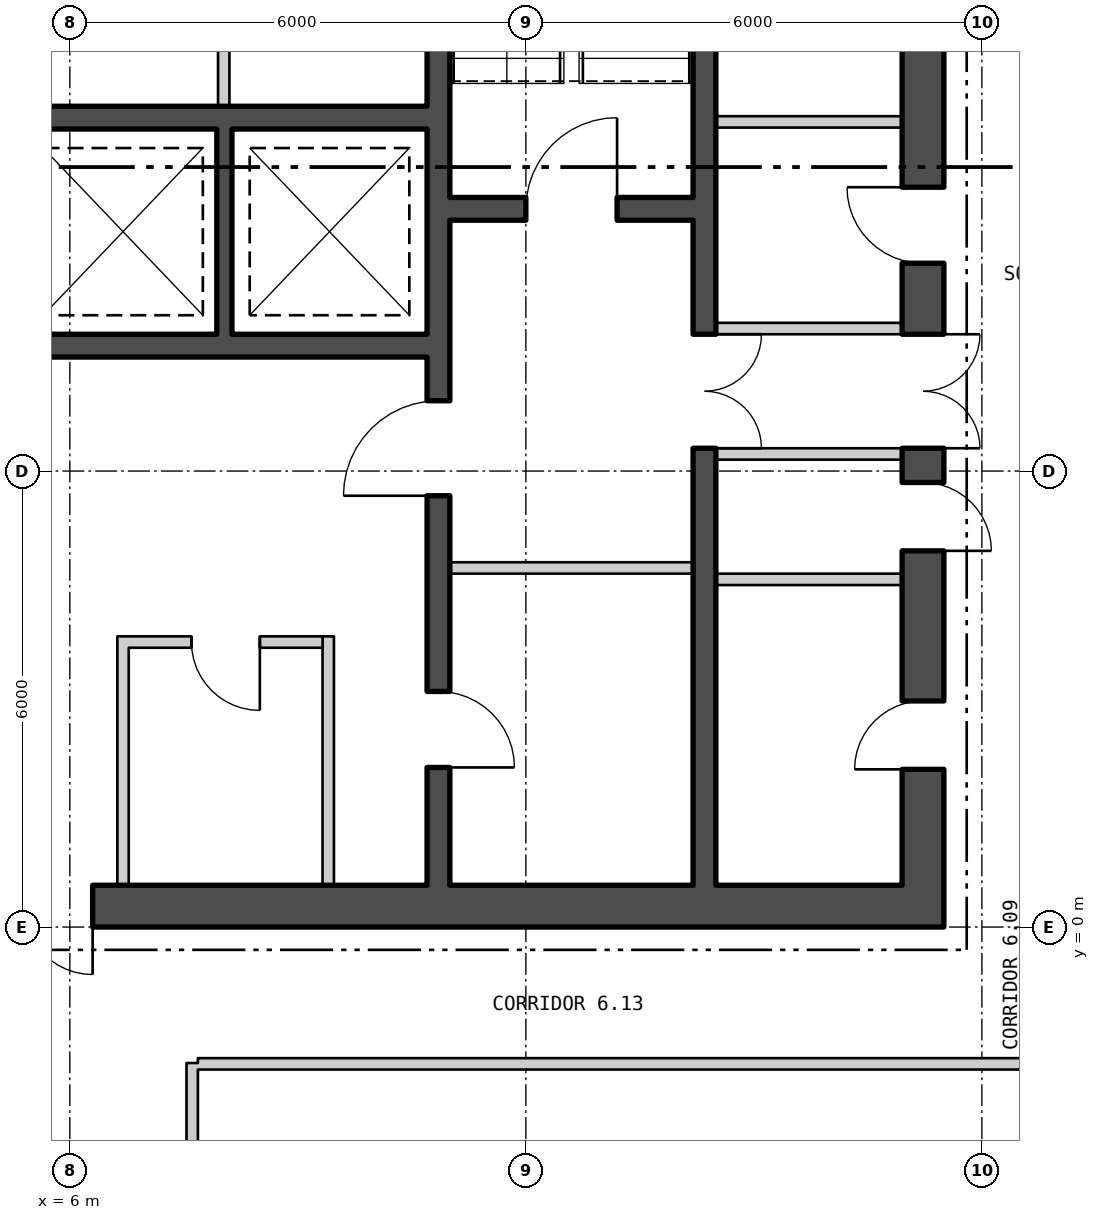
"""IFC4 building model, lengths in metres.
Left out: names, types, materials, properties, quantities, classifications, styles, units other than length and angle.
Written with IfcOpenShell. Run it as: python <this file> out.ifc"""

import sys

from ifc_helpers import new_model, si_unit, direction, frame, frame_2d, origin, place, context, subcontext, project, spatial, polyline, rectangle, outline, extrude, element, fill, save


model = new_model("IFC4")
c1 = context("Model", 3, precision=1e-05, world=origin(), true_north=direction((0.0, 1.0)))
c2 = subcontext(c1, "Body", "Model", "MODEL_VIEW")
j1 = project(units=[si_unit("LENGTHUNIT", "METRE"), si_unit("PLANEANGLEUNIT", "RADIAN")], contexts=[c1])
p1 = place(None, origin())
s1 = spatial("IfcSite", under=j1, at=p1, CompositionType="ELEMENT")
p2 = place(p1, origin())
s2 = spatial("IfcBuilding", under=s1, at=p2, CompositionType="ELEMENT")
p3 = place(p2, frame((0.0, 0.0, 84.3)))
s3 = spatial("IfcBuildingStorey", under=s2, at=p3, CompositionType="ELEMENT", Elevation=84.3)
p4 = place(p3, frame((5.085, -28.436, -0.18), z_axis=(0.0, 0.0, 1.0), x_axis=(0.499999194392, 0.866025868902, 0.0)))
e1 = element("IfcWall", 1, at=p4, inside=s3, PredefinedType="SOLIDWALL", context=c2, shape_type="SweptSolid", body=[
    extrude(outline(polyline([(-0.13, -0.225), (45.86, -0.225), (45.6, 0.225), (0.13, 0.225), (-0.13, -0.225)])), origin(), (0.0, 0.0, 1.0), 4.28),
])
p5 = place(p4, frame((1.424, 0.0, 1.08)))
e2 = element("IfcOpeningElement", 2, at=p5, cuts=e1, PredefinedType="OPENING", context=c2, shape_type="SweptSolid", body=[
    extrude(rectangle(XDim=2.4, YDim=2.6, at=frame_2d((1.2, 1.3))), frame((0.0, 0.235, 0.0), z_axis=(0.0, -1.0, 0.0), x_axis=(1.0, 0.0, 0.0)), (0.0, 0.0, 1.0), 0.47),
])
p6 = place(p4, frame((5.892, 0.0, 1.08)))
e3 = element("IfcOpeningElement", 3, at=p6, cuts=e1, PredefinedType="OPENING", context=c2, shape_type="SweptSolid", body=[
    extrude(rectangle(XDim=2.4, YDim=2.6, at=frame_2d((1.2, 1.3))), frame((0.0, 0.235, 0.0), z_axis=(0.0, -1.0, 0.0), x_axis=(1.0, 0.0, 0.0)), (0.0, 0.0, 1.0), 0.47),
])
p7 = place(p4, frame((10.399, 0.0, 1.08)))
e4 = element("IfcOpeningElement", 4, at=p7, cuts=e1, PredefinedType="OPENING", context=c2, shape_type="SweptSolid", body=[
    extrude(rectangle(XDim=2.4, YDim=2.6, at=frame_2d((1.2, 1.3))), frame((0.0, 0.235, 0.0), z_axis=(0.0, -1.0, 0.0), x_axis=(1.0, 0.0, 0.0)), (0.0, 0.0, 1.0), 0.47),
])
p8 = place(p4, frame((14.905, 0.0, 1.08)))
e5 = element("IfcOpeningElement", 5, at=p8, cuts=e1, PredefinedType="OPENING", context=c2, shape_type="SweptSolid", body=[
    extrude(rectangle(XDim=2.4, YDim=2.6, at=frame_2d((1.2, 1.3))), frame((0.0, 0.235, 0.0), z_axis=(0.0, -1.0, 0.0), x_axis=(1.0, 0.0, 0.0)), (0.0, 0.0, 1.0), 0.47),
])
p9 = place(p4, frame((19.412, 0.0, 1.08)))
e6 = element("IfcOpeningElement", 6, at=p9, cuts=e1, PredefinedType="OPENING", context=c2, shape_type="SweptSolid", body=[
    extrude(rectangle(XDim=2.4, YDim=2.6, at=frame_2d((1.2, 1.3))), frame((0.0, 0.235, 0.0), z_axis=(0.0, -1.0, 0.0), x_axis=(1.0, 0.0, 0.0)), (0.0, 0.0, 1.0), 0.47),
])
p10 = place(p4, frame((23.918, 0.0, 1.08)))
e7 = element("IfcOpeningElement", 7, at=p10, cuts=e1, PredefinedType="OPENING", context=c2, shape_type="SweptSolid", body=[
    extrude(rectangle(XDim=2.4, YDim=2.6, at=frame_2d((1.2, 1.3))), frame((0.0, 0.235, 0.0), z_axis=(0.0, -1.0, 0.0), x_axis=(1.0, 0.0, 0.0)), (0.0, 0.0, 1.0), 0.47),
])
p11 = place(p4, frame((28.425, 0.0, 1.08)))
e8 = element("IfcOpeningElement", 8, at=p11, cuts=e1, PredefinedType="OPENING", context=c2, shape_type="SweptSolid", body=[
    extrude(rectangle(XDim=2.4, YDim=2.6, at=frame_2d((1.2, 1.3))), frame((0.0, 0.235, 0.0), z_axis=(0.0, -1.0, 0.0), x_axis=(1.0, 0.0, 0.0)), (0.0, 0.0, 1.0), 0.47),
])
p12 = place(p4, frame((32.932, 0.0, 1.08)))
e9 = element("IfcOpeningElement", 9, at=p12, cuts=e1, PredefinedType="OPENING", context=c2, shape_type="SweptSolid", body=[
    extrude(rectangle(XDim=2.4, YDim=2.6, at=frame_2d((1.2, 1.3))), frame((0.0, 0.235, 0.0), z_axis=(0.0, -1.0, 0.0), x_axis=(1.0, 0.0, 0.0)), (0.0, 0.0, 1.0), 0.47),
])
p13 = place(p4, frame((37.438, 0.0, 1.08)))
e10 = element("IfcOpeningElement", 10, at=p13, cuts=e1, PredefinedType="OPENING", context=c2, shape_type="SweptSolid", body=[
    extrude(rectangle(XDim=2.4, YDim=2.6, at=frame_2d((1.2, 1.3))), frame((0.0, 0.235, 0.0), z_axis=(0.0, -1.0, 0.0), x_axis=(1.0, 0.0, 0.0)), (0.0, 0.0, 1.0), 0.47),
])
p14 = place(p4, frame((41.907, 0.0, 1.08)))
e11 = element("IfcOpeningElement", 11, at=p14, cuts=e1, PredefinedType="OPENING", context=c2, shape_type="SweptSolid", body=[
    extrude(rectangle(XDim=2.4, YDim=2.6, at=frame_2d((1.2, 1.3))), frame((0.0, 0.235, 0.0), z_axis=(0.0, -1.0, 0.0), x_axis=(1.0, 0.0, 0.0)), (0.0, 0.0, 1.0), 0.47),
])
p15 = place(p3, frame((-17.5, 0.275, 0.0), z_axis=(0.0, 0.0, 1.0), x_axis=(1.0, 0.0, 0.0)))
e12 = element("IfcWall", 12, at=p15, inside=s3, PredefinedType="SHEAR", context=c2, shape_type="SweptSolid", body=[
    extrude(rectangle(XDim=35.0, YDim=0.55, at=frame_2d((17.5, 0.0))), origin(), (0.0, 0.0, 1.0), 4.3),
])
p16 = place(p15, frame((12.0, 0.0, 0.0)))
e13 = element("IfcOpeningElement", 13, at=p16, cuts=e12, PredefinedType="OPENING", context=c2, shape_type="SweptSolid", body=[
    extrude(rectangle(XDim=1.8, YDim=2.4, at=frame_2d((0.9, 1.2))), frame((0.0, 0.285, 0.0), z_axis=(0.0, -1.0, 0.0), x_axis=(1.0, 0.0, 0.0)), (0.0, 0.0, 1.0), 0.57),
])
p17 = place(p15, frame((22.0, 0.0, 0.0)))
e14 = element("IfcOpeningElement", 14, at=p17, cuts=e12, PredefinedType="OPENING", context=c2, shape_type="SweptSolid", body=[
    extrude(rectangle(XDim=1.8, YDim=2.4, at=frame_2d((0.9, 1.2))), frame((0.0, 0.285, 0.0), z_axis=(0.0, -1.0, 0.0), x_axis=(1.0, 0.0, 0.0)), (0.0, 0.0, 1.0), 0.57),
])
p18 = place(p3, frame((17.225, 0.55, 0.0), z_axis=(0.0, 0.0, 1.0), x_axis=(0.0, 1.0, 0.0)))
e15 = element("IfcWall", 15, at=p18, inside=s3, PredefinedType="SHEAR", context=c2, shape_type="SweptSolid", body=[
    extrude(rectangle(XDim=16.9, YDim=0.55, at=frame_2d((8.45, 0.0))), origin(), (0.0, 0.0, 1.0), 4.3),
])
p19 = place(p18, frame((5.75, 0.0, 0.0)))
e16 = element("IfcOpeningElement", 16, at=p19, cuts=e15, PredefinedType="OPENING", context=c2, shape_type="SweptSolid", body=[
    extrude(rectangle(XDim=1.5, YDim=2.1, at=frame_2d((0.75, 1.05))), frame((0.0, 0.285, 0.0), z_axis=(0.0, -1.0, 0.0), x_axis=(1.0, 0.0, 0.0)), (0.0, 0.0, 1.0), 0.57),
])
p20 = place(p18, frame((1.525, 0.0, 0.0)))
e17 = element("IfcOpeningElement", 17, at=p20, cuts=e15, PredefinedType="OPENING", context=c2, shape_type="SweptSolid", body=[
    extrude(rectangle(XDim=0.9, YDim=2.1, at=frame_2d((0.45, 1.05))), frame((0.0, 0.285, 0.0), z_axis=(0.0, -1.0, 0.0), x_axis=(1.0, 0.0, 0.0)), (0.0, 0.0, 1.0), 0.57),
])
p21 = place(p18, frame((4.4, 0.0, 0.0)))
e18 = element("IfcOpeningElement", 18, at=p21, cuts=e15, PredefinedType="OPENING", context=c2, shape_type="SweptSolid", body=[
    extrude(rectangle(XDim=0.9, YDim=2.1, at=frame_2d((0.45, 1.05))), frame((0.0, 0.285, 0.0), z_axis=(0.0, -1.0, 0.0), x_axis=(1.0, 0.0, 0.0)), (0.0, 0.0, 1.0), 0.57),
])
p22 = place(p18, frame((8.184, 0.0, 0.0)))
e19 = element("IfcOpeningElement", 19, at=p22, cuts=e15, PredefinedType="OPENING", context=c2, shape_type="SweptSolid", body=[
    extrude(rectangle(XDim=1.0, YDim=2.1, at=frame_2d((0.5, 1.05))), frame((0.0, 0.285, 0.0), z_axis=(0.0, -1.0, 0.0), x_axis=(1.0, 0.0, 0.0)), (0.0, 0.0, 1.0), 0.57),
])
p23 = place(p18, frame((13.059, 0.0, 0.0)))
e20 = element("IfcOpeningElement", 20, at=p23, cuts=e15, PredefinedType="OPENING", context=c2, shape_type="SweptSolid", body=[
    extrude(rectangle(XDim=0.9, YDim=2.1, at=frame_2d((0.45, 1.05))), frame((0.0, 0.285, 0.0), z_axis=(0.0, -1.0, 0.0), x_axis=(1.0, 0.0, 0.0)), (0.0, 0.0, 1.0), 0.57),
])
p24 = place(p3, frame((10.85, 0.55, 0.0), z_axis=(0.0, 0.0, 1.0), x_axis=(0.0, 1.0, 0.0)))
e21 = element("IfcWall", 21, at=p24, inside=s3, PredefinedType="SHEAR", context=c2, shape_type="SweptSolid", body=[
    extrude(rectangle(XDim=16.9, YDim=0.3, at=frame_2d((8.45, 0.0))), origin(), (0.0, 0.0, 1.0), 4.3),
])
p25 = place(p24, frame((5.125, 0.0, 0.0)))
e22 = element("IfcOpeningElement", 22, at=p25, cuts=e21, PredefinedType="OPENING", context=c2, shape_type="SweptSolid", body=[
    extrude(rectangle(XDim=1.25, YDim=2.1, at=frame_2d((0.625, 1.05))), frame((0.0, 0.16, 0.0), z_axis=(0.0, -1.0, 0.0), x_axis=(1.0, 0.0, 0.0)), (0.0, 0.0, 1.0), 0.32),
])
p26 = place(p24, frame((1.55, 0.0, 0.0)))
e23 = element("IfcOpeningElement", 23, at=p26, cuts=e21, PredefinedType="OPENING", context=c2, shape_type="SweptSolid", body=[
    extrude(rectangle(XDim=1.0, YDim=2.1, at=frame_2d((0.5, 1.05))), frame((0.0, 0.16, 0.0), z_axis=(0.0, -1.0, 0.0), x_axis=(1.0, 0.0, 0.0)), (0.0, 0.0, 1.0), 0.32),
])
p27 = place(p3, frame((14.35, 0.55, 0.0), z_axis=(0.0, 0.0, 1.0), x_axis=(0.0, 1.0, 0.0)))
e24 = element("IfcWall", 24, at=p27, inside=s3, PredefinedType="SHEAR", context=c2, shape_type="SweptSolid", body=[
    extrude(rectangle(XDim=16.9, YDim=0.3, at=frame_2d((8.45, 0.0))), origin(), (0.0, 0.0, 1.0), 4.3),
])
p28 = place(p27, frame((5.75, 0.0, 0.0)))
e25 = element("IfcOpeningElement", 25, at=p28, cuts=e24, PredefinedType="OPENING", context=c2, shape_type="SweptSolid", body=[
    extrude(rectangle(XDim=1.5, YDim=2.1, at=frame_2d((0.75, 1.05))), frame((0.0, 0.16, 0.0), z_axis=(0.0, -1.0, 0.0), x_axis=(1.0, 0.0, 0.0)), (0.0, 0.0, 1.0), 0.32),
])
p29 = place(p3, frame((11.0, 9.45, 0.0), z_axis=(0.0, 0.0, 1.0), x_axis=(1.0, 0.0, 0.0)))
e26 = element("IfcWall", 26, at=p29, inside=s3, PredefinedType="SHEAR", context=c2, shape_type="SweptSolid", body=[
    extrude(rectangle(XDim=3.2, YDim=0.3, at=frame_2d((1.6, 0.0))), origin(), (0.0, 0.0, 1.0), 4.3),
])
p30 = place(p29, frame((1.0, 0.0, 0.0)))
e27 = element("IfcOpeningElement", 27, at=p30, cuts=e26, PredefinedType="OPENING", context=c2, shape_type="SweptSolid", body=[
    extrude(rectangle(XDim=1.2, YDim=2.1, at=frame_2d((0.6, 1.05))), frame((0.0, 0.16, 0.0), z_axis=(0.0, -1.0, 0.0), x_axis=(1.0, 0.0, 0.0)), (0.0, 0.0, 1.0), 0.32),
])
for number, where, z_axis, x_axis in (
    (28, (2.6, 10.65, 0.0), (0.0, 0.0, 1.0), (1.0, 0.0, 0.0)),
    (29, (2.6, 7.65, 0.0), (0.0, 0.0, 1.0), (1.0, 0.0, 0.0)),
):
    element("IfcWall", number, at=place(p3, frame(where, z_axis=z_axis, x_axis=x_axis)), inside=s3, PredefinedType="SHEAR", context=c2, shape_type="SweptSolid", body=[
        extrude(rectangle(XDim=8.1, YDim=0.3, at=frame_2d((4.05, 0.0))), origin(), (0.0, 0.0, 1.0), 4.3),
    ])
p31 = place(p3, frame((8.033, 7.8, 0.0), z_axis=(0.0, 0.0, 1.0), x_axis=(0.0, 1.0, 0.0)))
e30 = element("IfcWall", 30, at=p31, inside=s3, PredefinedType="SHEAR", context=c2, shape_type="SweptSolid", body=[
    extrude(rectangle(XDim=2.7, YDim=0.2, at=frame_2d((1.35, 0.0))), origin(), (0.0, 0.0, 1.0), 4.3),
])
p32 = place(p3, frame((8.025, 10.8, 0.0), z_axis=(0.0, 0.0, 1.0), x_axis=(0.0, 1.0, 0.0)))
e31 = element("IfcWall", 31, at=p32, inside=s3, PredefinedType="PARTITIONING", context=c2, shape_type="SweptSolid", body=[
    extrude(rectangle(XDim=3.6, YDim=0.15, at=frame_2d((1.8, 0.0))), origin(), (0.0, 0.0, 1.0), 4.3),
])
p33 = place(p32, frame((1.175, 0.0, 0.0)))
e32 = element("IfcOpeningElement", 32, at=p33, cuts=e31, PredefinedType="OPENING", context=c2, shape_type="SweptSolid", body=[
    extrude(rectangle(XDim=1.25, YDim=2.1, at=frame_2d((0.625, 1.05))), frame((0.0, 0.085, 0.0), z_axis=(0.0, -1.0, 0.0), x_axis=(1.0, 0.0, 0.0)), (0.0, 0.0, 1.0), 0.17),
])
p34 = place(p3, frame((11.0, 4.725, 0.0), z_axis=(0.0, 0.0, 1.0), x_axis=(1.0, 0.0, 0.0)))
e33 = element("IfcWall", 33, at=p34, inside=s3, PredefinedType="PARTITIONING", context=c2, shape_type="SweptSolid", body=[
    extrude(rectangle(XDim=3.2, YDim=0.15, at=frame_2d((1.6, 0.0))), origin(), (0.0, 0.0, 1.0), 4.3),
])
for number, where, z_axis, x_axis in (
    (34, (14.5, 6.225, 0.0), (0.0, 0.0, 1.0), (1.0, 0.0, 0.0)),
    (35, (14.5, 7.875, 0.0), (0.0, 0.0, 1.0), (1.0, 0.0, 0.0)),
    (36, (14.5, 4.575, 0.0), (0.0, 0.0, 1.0), (1.0, 0.0, 0.0)),
    (37, (14.5, 10.594, 0.0), (0.0, 0.0, 1.0), (1.0, 0.0, 0.0)),
):
    element("IfcWall", number, at=place(p3, frame(where, z_axis=z_axis, x_axis=x_axis)), inside=s3, PredefinedType="PARTITIONING", context=c2, shape_type="SweptSolid", body=[
        extrude(rectangle(XDim=2.45, YDim=0.15, at=frame_2d((1.225, 0.0))), origin(), (0.0, 0.0, 1.0), 4.3),
    ])
for number, where, z_axis, x_axis in (
    (38, (6.7, 0.55, 0.0), (0.0, 0.0, 1.0), (0.0, 1.0, 0.0)),
    (39, (9.4, 0.55, 0.0), (0.0, 0.0, 1.0), (0.0, 1.0, 0.0)),
):
    element("IfcWall", number, at=place(p3, frame(where, z_axis=z_axis, x_axis=x_axis)), inside=s3, PredefinedType="PARTITIONING", context=c2, shape_type="SweptSolid", body=[
        extrude(rectangle(XDim=3.275, YDim=0.15, at=frame_2d((1.637, 0.0))), origin(), (0.0, 0.0, 1.0), 4.3),
    ])
p35 = place(p3, frame((6.775, 3.75, 0.0), z_axis=(0.0, 0.0, 1.0), x_axis=(1.0, 0.0, 0.0)))
e40 = element("IfcWall", 40, at=p35, inside=s3, PredefinedType="PARTITIONING", context=c2, shape_type="SweptSolid", body=[
    extrude(rectangle(XDim=2.55, YDim=0.15, at=frame_2d((1.275, 0.0))), origin(), (0.0, 0.0, 1.0), 4.3),
])
p36 = place(p35, frame((0.825, 0.0, 0.0)))
e41 = element("IfcOpeningElement", 41, at=p36, cuts=e40, PredefinedType="OPENING", context=c2, shape_type="SweptSolid", body=[
    extrude(rectangle(XDim=0.9, YDim=2.1, at=frame_2d((0.45, 1.05))), frame((0.0, 0.085, 0.0), z_axis=(0.0, -1.0, 0.0), x_axis=(1.0, 0.0, 0.0)), (0.0, 0.0, 1.0), 0.17),
])
p37 = place(p3, frame((7.61, -3.508, 0.0), z_axis=(0.0, 0.0, 1.0), x_axis=(0.0, 1.0, 0.0)))
e42 = element("IfcWall", 42, at=p37, inside=s3, PredefinedType="PARTITIONING", context=c2, shape_type="SweptSolid", body=[
    extrude(rectangle(XDim=1.719, YDim=0.15, at=frame_2d((0.86, 0.0))), origin(), (0.0, 0.0, 1.0), 4.3),
])
p38 = place(p3, frame((7.685, -1.8, 0.0), z_axis=(0.0, 0.0, 1.0), x_axis=(1.0, 0.0, 0.0)))
e43 = element("IfcWall", 43, at=p38, inside=s3, PredefinedType="PARTITIONING", context=c2, shape_type="SweptSolid", body=[
    extrude(rectangle(XDim=11.54, YDim=0.15, at=frame_2d((5.77, 0.0))), origin(), (0.0, 0.0, 1.0), 4.3),
])
p39 = place(p30, origin())
e44 = element("IfcDoor", 44, at=p39, inside=s3, OperationType="SINGLE_SWING_LEFT", PredefinedType="DOOR", context=c2, shape_type="SweptSolid", body=[
    extrude(rectangle(XDim=1.2, YDim=2.1, at=frame_2d((0.6, 1.05))), frame((0.0, 0.025, 0.0), z_axis=(0.0, -1.0, 0.0), x_axis=(1.0, 0.0, 0.0)), (0.0, 0.0, 1.0), 0.05),
])
fill(e27, e44)
p40 = place(p25, origin())
e45 = element("IfcDoor", 45, at=p40, inside=s3, OperationType="SINGLE_SWING_RIGHT", PredefinedType="DOOR", context=c2, shape_type="SweptSolid", body=[
    extrude(rectangle(XDim=1.25, YDim=2.1, at=frame_2d((0.625, 1.05))), frame((0.0, 0.025, 0.0), z_axis=(0.0, -1.0, 0.0), x_axis=(1.0, 0.0, 0.0)), (0.0, 0.0, 1.0), 0.05),
])
fill(e22, e45)
p41 = place(p26, origin())
e46 = element("IfcDoor", 46, at=p41, inside=s3, OperationType="SINGLE_SWING_LEFT", PredefinedType="DOOR", context=c2, shape_type="SweptSolid", body=[
    extrude(rectangle(XDim=1.0, YDim=2.1, at=frame_2d((0.5, 1.05))), frame((0.0, 0.025, 0.0), z_axis=(0.0, -1.0, 0.0), x_axis=(1.0, 0.0, 0.0)), (0.0, 0.0, 1.0), 0.05),
])
fill(e23, e46)
p42 = place(p28, origin())
e47 = element("IfcDoor", 47, at=p42, inside=s3, OperationType="DOUBLE_DOOR_SINGLE_SWING", PredefinedType="DOOR", context=c2, shape_type="SweptSolid", body=[
    extrude(rectangle(XDim=1.5, YDim=2.1, at=frame_2d((0.75, 1.05))), frame((0.0, 0.025, 0.0), z_axis=(0.0, -1.0, 0.0), x_axis=(1.0, 0.0, 0.0)), (0.0, 0.0, 1.0), 0.05),
])
fill(e25, e47)
p43 = place(p19, origin())
e48 = element("IfcDoor", 48, at=p43, inside=s3, OperationType="DOUBLE_DOOR_SINGLE_SWING", PredefinedType="DOOR", context=c2, shape_type="SweptSolid", body=[
    extrude(rectangle(XDim=1.5, YDim=2.1, at=frame_2d((0.75, 1.05))), frame((0.0, 0.025, 0.0), z_axis=(0.0, -1.0, 0.0), x_axis=(1.0, 0.0, 0.0)), (0.0, 0.0, 1.0), 0.05),
])
fill(e16, e48)
p44 = place(p20, origin())
e49 = element("IfcDoor", 49, at=p44, inside=s3, OperationType="SINGLE_SWING_RIGHT", PredefinedType="DOOR", context=c2, shape_type="SweptSolid", body=[
    extrude(rectangle(XDim=0.9, YDim=2.1, at=frame_2d((0.45, 1.05))), frame((0.0, 0.025, 0.0), z_axis=(0.0, -1.0, 0.0), x_axis=(1.0, 0.0, 0.0)), (0.0, 0.0, 1.0), 0.05),
])
fill(e17, e49)
p45 = place(p21, origin())
e50 = element("IfcDoor", 50, at=p45, inside=s3, OperationType="SINGLE_SWING_LEFT", PredefinedType="DOOR", context=c2, shape_type="SweptSolid", body=[
    extrude(rectangle(XDim=0.9, YDim=2.1, at=frame_2d((0.45, 1.05))), frame((0.0, 0.025, 0.0), z_axis=(0.0, -1.0, 0.0), x_axis=(1.0, 0.0, 0.0)), (0.0, 0.0, 1.0), 0.05),
])
fill(e18, e50)
p46 = place(p22, origin())
e51 = element("IfcDoor", 51, at=p46, inside=s3, OperationType="SINGLE_SWING_LEFT", PredefinedType="DOOR", context=c2, shape_type="SweptSolid", body=[
    extrude(rectangle(XDim=1.0, YDim=2.1, at=frame_2d((0.5, 1.05))), frame((0.0, 0.025, 0.0), z_axis=(0.0, -1.0, 0.0), x_axis=(1.0, 0.0, 0.0)), (0.0, 0.0, 1.0), 0.05),
])
fill(e19, e51)
p47 = place(p36, origin())
e52 = element("IfcDoor", 52, at=p47, inside=s3, OperationType="SINGLE_SWING_RIGHT", PredefinedType="DOOR", context=c2, shape_type="SweptSolid", body=[
    extrude(rectangle(XDim=0.9, YDim=2.1, at=frame_2d((0.45, 1.05))), frame((0.0, 0.025, 0.0), z_axis=(0.0, -1.0, 0.0), x_axis=(1.0, 0.0, 0.0)), (0.0, 0.0, 1.0), 0.05),
])
fill(e41, e52)
p48 = place(p17, origin())
e53 = element("IfcDoor", 53, at=p48, inside=s3, OperationType="DOUBLE_DOOR_SINGLE_SWING", PredefinedType="DOOR", context=c2, shape_type="SweptSolid", body=[
    extrude(rectangle(XDim=1.8, YDim=2.4, at=frame_2d((0.9, 1.2))), frame((0.0, 0.025, 0.0), z_axis=(0.0, -1.0, 0.0), x_axis=(1.0, 0.0, 0.0)), (0.0, 0.0, 1.0), 0.05),
])
fill(e14, e53)
save(model, sys.argv[1])
